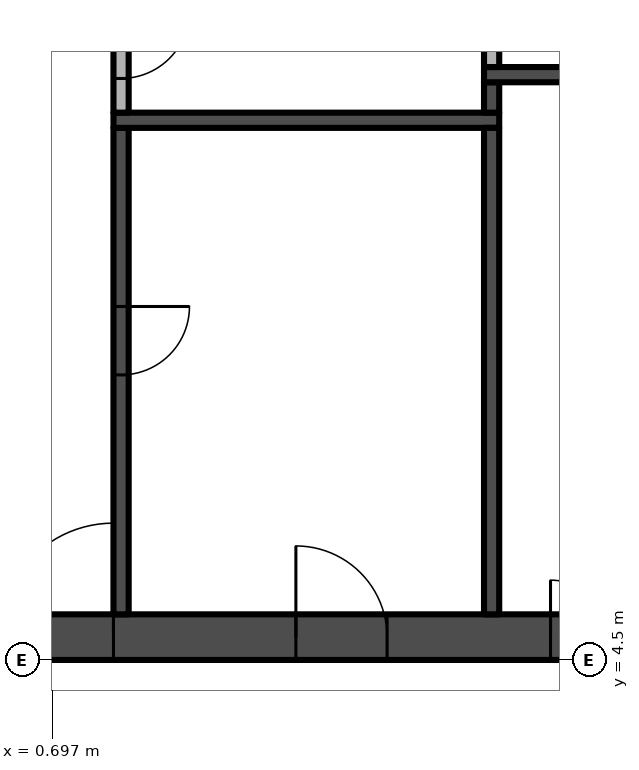
"""IFC4 building model, lengths in metres.
Left out: names, types, materials, properties, quantities, classifications, styles, units other than length and angle.
Written with IfcOpenShell. Run it as: python <this file> out.ifc"""

import sys

from ifc_helpers import new_model, si_unit, direction, frame, frame_2d, origin, place, context, subcontext, project, spatial, rectangle, extrude, element, fill, save


model = new_model("IFC4")
c1 = context("Model", 3, precision=1e-05, world=origin(), true_north=direction((0.0, 1.0)))
c2 = subcontext(c1, "Body", "Model", "MODEL_VIEW")
j1 = project(units=[si_unit("LENGTHUNIT", "METRE"), si_unit("PLANEANGLEUNIT", "RADIAN")], contexts=[c1])
p1 = place(None, origin())
s1 = spatial("IfcSite", under=j1, at=p1, CompositionType="ELEMENT")
p2 = place(p1, origin())
s2 = spatial("IfcBuilding", under=s1, at=p2, CompositionType="ELEMENT")
p3 = place(p2, frame((0.0, 0.0, 195.8)))
s3 = spatial("IfcBuildingStorey", under=s2, at=p3, CompositionType="ELEMENT", Elevation=195.8)
p4 = place(p3, frame((-13.5, 4.8, -0.3), z_axis=(0.0, 0.0, 1.0), x_axis=(1.0, 0.0, 0.0)))
e1 = element("IfcWall", 1, at=p4, inside=s3, PredefinedType="SHEAR", context=c2, shape_type="SweptSolid", body=[
    extrude(rectangle(XDim=27.0, YDim=0.6, at=frame_2d((13.5, 0.0))), origin(), (0.0, 0.0, 1.0), 3.8),
])
p5 = place(p4, frame((12.0, 0.0, 0.3)))
e2 = element("IfcOpeningElement", 2, at=p5, cuts=e1, PredefinedType="OPENING", context=c2, shape_type="SweptSolid", body=[
    extrude(rectangle(XDim=3.0, YDim=2.4, at=frame_2d((1.5, 1.2))), frame((0.0, 0.31, 0.0), z_axis=(0.0, -1.0, 0.0), x_axis=(1.0, 0.0, 0.0)), (0.0, 0.0, 1.0), 0.62),
])
p6 = place(p4, frame((4.9, 0.0, 0.3)))
e3 = element("IfcOpeningElement", 3, at=p6, cuts=e1, PredefinedType="OPENING", context=c2, shape_type="SweptSolid", body=[
    extrude(rectangle(XDim=1.2, YDim=2.2, at=frame_2d((0.6, 1.1))), frame((0.0, 0.31, 0.0), z_axis=(0.0, -1.0, 0.0), x_axis=(1.0, 0.0, 0.0)), (0.0, 0.0, 1.0), 0.62),
])
p7 = place(p4, frame((20.75, 0.0, 0.3)))
e4 = element("IfcOpeningElement", 4, at=p7, cuts=e1, PredefinedType="OPENING", context=c2, shape_type="SweptSolid", body=[
    extrude(rectangle(XDim=1.5, YDim=2.2, at=frame_2d((0.75, 1.1))), frame((0.0, 0.31, 0.0), z_axis=(0.0, -1.0, 0.0), x_axis=(1.0, 0.0, 0.0)), (0.0, 0.0, 1.0), 0.62),
])
p8 = place(p4, frame((17.4, 0.0, 0.3)))
e5 = element("IfcOpeningElement", 5, at=p8, cuts=e1, PredefinedType="OPENING", context=c2, shape_type="SweptSolid", body=[
    extrude(rectangle(XDim=1.2, YDim=2.2, at=frame_2d((0.6, 1.1))), frame((0.0, 0.31, 0.0), z_axis=(0.0, -1.0, 0.0), x_axis=(1.0, 0.0, 0.0)), (0.0, 0.0, 1.0), 0.62),
])
p9 = place(p3, frame((1.6, 11.5, 0.0), z_axis=(0.0, 0.0, 1.0), x_axis=(0.0, -1.0, 0.0)))
e6 = element("IfcWall", 6, at=p9, inside=s3, PredefinedType="SHEAR", context=c2, shape_type="SweptSolid", body=[
    extrude(rectangle(XDim=6.4, YDim=0.2, at=frame_2d((3.2, 0.0))), origin(), (0.0, 0.0, 1.0), 3.5),
])
p10 = place(p9, frame((2.35, 0.0, 0.0)))
e7 = element("IfcOpeningElement", 7, at=p10, cuts=e6, PredefinedType="OPENING", context=c2, shape_type="SweptSolid", body=[
    extrude(rectangle(XDim=0.9, YDim=2.1, at=frame_2d((0.45, 1.05))), frame((0.0, 0.11, 0.0), z_axis=(0.0, -1.0, 0.0), x_axis=(1.0, 0.0, 0.0)), (0.0, 0.0, 1.0), 0.22),
])
p11 = place(p3, frame((1.5, 11.6, 0.0), z_axis=(0.0, 0.0, 1.0), x_axis=(1.0, 0.0, 0.0)))
e8 = element("IfcWall", 8, at=p11, inside=s3, PredefinedType="SHEAR", context=c2, shape_type="SweptSolid", body=[
    extrude(rectangle(XDim=5.075, YDim=0.2, at=frame_2d((2.538, 0.0))), origin(), (0.0, 0.0, 1.0), 3.5),
])
p12 = place(p3, frame((1.6, 13.5, 0.0), z_axis=(0.0, 0.0, 1.0), x_axis=(0.0, -1.0, 0.0)))
e9 = element("IfcWall", 9, at=p12, inside=s3, PredefinedType="PARTITIONING", context=c2, shape_type="SweptSolid", body=[
    extrude(rectangle(XDim=1.8, YDim=0.2, at=frame_2d((0.9, 0.0))), origin(), (0.0, 0.0, 1.0), 3.5),
])
p13 = place(p12, frame((0.45, 0.0, 0.0)))
e10 = element("IfcOpeningElement", 10, at=p13, cuts=e9, PredefinedType="OPENING", context=c2, shape_type="SweptSolid", body=[
    extrude(rectangle(XDim=0.9, YDim=2.1, at=frame_2d((0.45, 1.05))), frame((0.0, 0.11, 0.0), z_axis=(0.0, -1.0, 0.0), x_axis=(1.0, 0.0, 0.0)), (0.0, 0.0, 1.0), 0.22),
])
p14 = place(p3, frame((6.475, 5.1, 0.0), z_axis=(0.0, 0.0, 1.0), x_axis=(0.0, 1.0, 0.0)))
e11 = element("IfcWall", 11, at=p14, inside=s3, PredefinedType="SHEAR", context=c2, shape_type="SweptSolid", body=[
    extrude(rectangle(XDim=6.4, YDim=0.2, at=frame_2d((3.2, 0.0))), origin(), (0.0, 0.0, 1.0), 3.5),
])
p15 = place(p3, frame((6.475, 11.7, 0.0), z_axis=(0.0, 0.0, 1.0), x_axis=(0.0, 1.0, 0.0)))
e12 = element("IfcWall", 12, at=p15, inside=s3, PredefinedType="SHEAR", context=c2, shape_type="SweptSolid", body=[
    extrude(rectangle(XDim=0.4, YDim=0.2, at=frame_2d((0.2, 0.0))), origin(), (0.0, 0.0, 1.0), 3.5),
])
p16 = place(p3, frame((6.375, 12.2, 0.0), z_axis=(0.0, 0.0, 1.0), x_axis=(1.0, 0.0, 0.0)))
e13 = element("IfcWall", 13, at=p16, inside=s3, PredefinedType="SHEAR", context=c2, shape_type="SweptSolid", body=[
    extrude(rectangle(XDim=3.475, YDim=0.2, at=frame_2d((1.738, 0.0))), origin(), (0.0, 0.0, 1.0), 3.5),
])
p17 = place(p3, frame((6.475, 12.3, 0.0), z_axis=(0.0, 0.0, 1.0), x_axis=(0.0, 1.0, 0.0)))
e14 = element("IfcWall", 14, at=p17, inside=s3, PredefinedType="PARTITIONING", context=c2, shape_type="SweptSolid", body=[
    extrude(rectangle(XDim=1.2, YDim=0.2, at=frame_2d((0.6, 0.0))), origin(), (0.0, 0.0, 1.0), 3.5),
])
p18 = place(p5, frame((3.0, 0.0, 0.0), z_axis=(0.0, 0.0, 1.0), x_axis=(-1.0, 0.0, 0.0)))
e15 = element("IfcDoor", 15, at=p18, inside=s3, OperationType="DOUBLE_DOOR_SINGLE_SWING", PredefinedType="DOOR", context=c2, shape_type="SweptSolid", body=[
    extrude(rectangle(XDim=3.0, YDim=2.4, at=frame_2d((1.5, 1.2))), frame((0.0, 0.025, 0.0), z_axis=(0.0, -1.0, 0.0), x_axis=(1.0, 0.0, 0.0)), (0.0, 0.0, 1.0), 0.05),
])
fill(e2, e15)
p19 = place(p7, frame((1.5, 0.0, 0.0), z_axis=(0.0, 0.0, 1.0), x_axis=(-1.0, 0.0, 0.0)))
e16 = element("IfcDoor", 16, at=p19, inside=s3, OperationType="DOUBLE_DOOR_SINGLE_SWING", PredefinedType="DOOR", context=c2, shape_type="SweptSolid", body=[
    extrude(rectangle(XDim=1.5, YDim=2.2, at=frame_2d((0.75, 1.1))), frame((0.0, 0.025, 0.0), z_axis=(0.0, -1.0, 0.0), x_axis=(1.0, 0.0, 0.0)), (0.0, 0.0, 1.0), 0.05),
])
fill(e4, e16)
p20 = place(p8, frame((1.2, 0.0, 0.0), z_axis=(0.0, 0.0, 1.0), x_axis=(-1.0, 0.0, 0.0)))
e17 = element("IfcDoor", 17, at=p20, inside=s3, OperationType="SINGLE_SWING_RIGHT", PredefinedType="DOOR", context=c2, shape_type="SweptSolid", body=[
    extrude(rectangle(XDim=1.2, YDim=2.2, at=frame_2d((0.6, 1.1))), frame((0.0, 0.025, 0.0), z_axis=(0.0, -1.0, 0.0), x_axis=(1.0, 0.0, 0.0)), (0.0, 0.0, 1.0), 0.05),
])
fill(e5, e17)
p21 = place(p10, origin())
e18 = element("IfcDoor", 18, at=p21, inside=s3, OperationType="SINGLE_SWING_LEFT", PredefinedType="DOOR", context=c2, shape_type="SweptSolid", body=[
    extrude(rectangle(XDim=0.9, YDim=2.1, at=frame_2d((0.45, 1.05))), frame((0.0, 0.025, 0.0), z_axis=(0.0, -1.0, 0.0), x_axis=(1.0, 0.0, 0.0)), (0.0, 0.0, 1.0), 0.05),
])
fill(e7, e18)
p22 = place(p13, origin())
e19 = element("IfcDoor", 19, at=p22, inside=s3, OperationType="SINGLE_SWING_LEFT", PredefinedType="DOOR", context=c2, shape_type="SweptSolid", body=[
    extrude(rectangle(XDim=0.9, YDim=2.1, at=frame_2d((0.45, 1.05))), frame((0.0, 0.025, 0.0), z_axis=(0.0, -1.0, 0.0), x_axis=(1.0, 0.0, 0.0)), (0.0, 0.0, 1.0), 0.05),
])
fill(e10, e19)
save(model, sys.argv[1])
